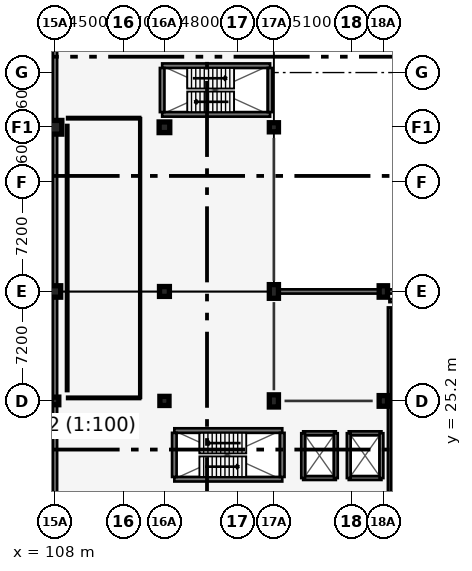
"""IFC4 building model, lengths in metres.
Left out: names, types, materials, properties, quantities, classifications, styles, units other than length and angle.
Written with IfcOpenShell. Run it as: python <this file> out.ifc"""

import sys

from ifc_helpers import new_model, si_unit, direction, frame, frame_2d, origin, origin_2d, place, context, subcontext, project, spatial, rectangle, circle, extrude, element, fill, save


model = new_model("IFC4")
c1 = context("Model", 3, precision=1e-05, world=origin(), true_north=direction((0.0, 1.0)))
c2 = subcontext(c1, "Body", "Model", "MODEL_VIEW")
j1 = project(units=[si_unit("LENGTHUNIT", "METRE"), si_unit("PLANEANGLEUNIT", "RADIAN")], contexts=[c1])
p1 = place(None, origin())
s1 = spatial("IfcSite", under=j1, at=p1, CompositionType="ELEMENT")
p2 = place(p1, origin())
s2 = spatial("IfcBuilding", under=s1, at=p2, CompositionType="ELEMENT")
p3 = place(p2, frame((0.0, 0.0, 9.0)))
s3 = spatial("IfcBuildingStorey", under=s2, at=p3, CompositionType="ELEMENT", Elevation=9.0)
p4 = place(p3, frame((108.0, 25.2, 0.0), z_axis=(0.0, 0.0, 1.0), x_axis=(1.0, 0.0, 0.0)))
e1 = element("IfcColumn", 1, at=p4, inside=s3, PredefinedType="COLUMN", context=c2, shape_type="SweptSolid", body=[
    extrude(circle(Radius=0.25, at=origin_2d()), origin(), (0.0, 0.0, 1.0), 4.2),
])
p5 = place(p3, frame((108.0, 32.4, 0.0), z_axis=(0.0, 0.0, 1.0), x_axis=(1.0, 0.0, 0.0)))
e2 = element("IfcColumn", 2, at=p5, inside=s3, PredefinedType="COLUMN", context=c2, shape_type="SweptSolid", body=[
    extrude(circle(Radius=0.375, at=origin_2d()), origin(), (0.0, 0.0, 1.0), 4.2),
])
p6 = place(p3, frame((108.0, 43.2, 0.0), z_axis=(0.0, 0.0, 1.0), x_axis=(1.0, 0.0, 0.0)))
e3 = element("IfcColumn", 3, at=p6, inside=s3, PredefinedType="COLUMN", context=c2, shape_type="SweptSolid", body=[
    extrude(circle(Radius=0.45, at=origin_2d()), origin(), (0.0, 0.0, 1.0), 4.2),
])
p7 = place(p3, frame((115.2, 25.2, 0.0), z_axis=(0.0, 0.0, 1.0), x_axis=(1.0, 0.0, 0.0)))
e4 = element("IfcColumn", 4, at=p7, inside=s3, PredefinedType="COLUMN", context=c2, shape_type="SweptSolid", body=[
    extrude(rectangle(XDim=0.6, YDim=0.6, at=origin_2d()), origin(), (0.0, 0.0, 1.0), 4.2),
])
p8 = place(p3, frame((115.2, 32.4, 0.0), z_axis=(0.0, 0.0, 1.0), x_axis=(1.0, 0.0, 0.0)))
e5 = element("IfcColumn", 5, at=p8, inside=s3, PredefinedType="COLUMN", context=c2, shape_type="SweptSolid", body=[
    extrude(rectangle(XDim=0.65, YDim=0.65, at=origin_2d()), origin(), (0.0, 0.0, 1.0), 4.2),
])
p9 = place(p3, frame((115.2, 43.2, 0.0), z_axis=(0.0, 0.0, 1.0), x_axis=(1.0, 0.0, 0.0)))
e6 = element("IfcColumn", 6, at=p9, inside=s3, PredefinedType="COLUMN", context=c2, shape_type="SweptSolid", body=[
    extrude(rectangle(XDim=0.7, YDim=0.7, at=origin_2d()), origin(), (0.0, 0.0, 1.0), 4.2),
])
p10 = place(p3, frame((122.4, 25.2, 0.0), z_axis=(0.0, 0.0, 1.0), x_axis=(1.0, 0.0, 0.0)))
e7 = element("IfcColumn", 7, at=p10, inside=s3, PredefinedType="COLUMN", context=c2, shape_type="SweptSolid", body=[
    extrude(rectangle(XDim=0.6, YDim=0.8, at=origin_2d()), origin(), (0.0, 0.0, 1.0), 4.2),
])
p11 = place(p3, frame((122.4, 32.4, 0.0), z_axis=(0.0, 0.0, 1.0), x_axis=(1.0, 0.0, 0.0)))
e8 = element("IfcColumn", 8, at=p11, inside=s3, PredefinedType="COLUMN", context=c2, shape_type="SweptSolid", body=[
    extrude(rectangle(XDim=0.6, YDim=0.9, at=origin_2d()), origin(), (0.0, 0.0, 1.0), 4.2),
])
p12 = place(p3, frame((122.4, 43.2, 0.0), z_axis=(0.0, 0.0, 1.0), x_axis=(1.0, 0.0, 0.0)))
e9 = element("IfcColumn", 9, at=p12, inside=s3, PredefinedType="COLUMN", context=c2, shape_type="SweptSolid", body=[
    extrude(circle(Radius=0.3, at=origin_2d()), origin(), (0.0, 0.0, 1.0), 4.2),
])
p13 = place(p3, frame((129.6, 25.2, 0.0), z_axis=(0.0, 0.0, 1.0), x_axis=(1.0, 0.0, 0.0)))
e10 = element("IfcColumn", 10, at=p13, inside=s3, PredefinedType="COLUMN", context=c2, shape_type="SweptSolid", body=[
    extrude(rectangle(XDim=0.55, YDim=0.7, at=origin_2d()), origin(), (0.0, 0.0, 1.0), 4.2),
])
p14 = place(p3, frame((129.6, 32.4, 0.0), z_axis=(0.0, 0.0, 1.0), x_axis=(1.0, 0.0, 0.0)))
e11 = element("IfcColumn", 11, at=p14, inside=s3, PredefinedType="COLUMN", context=c2, shape_type="SweptSolid", body=[
    extrude(rectangle(XDim=0.55, YDim=0.75, at=origin_2d()), origin(), (0.0, 0.0, 1.0), 4.2),
])
p15 = place(p3, frame((108.0, 54.0, 0.0), z_axis=(0.0, 0.0, 1.0), x_axis=(0.0, -1.0, 0.0)))
e12 = element("IfcWall", 12, at=p15, inside=s3, PredefinedType="SOLIDWALL", context=c2, shape_type="SweptSolid", body=[
    extrude(rectangle(XDim=54.0, YDim=0.28, at=frame_2d((27.0, 0.0))), origin(), (0.0, 0.0, 1.0), 3.4),
])
p16 = place(p15, frame((2.2, 0.0, 0.78)))
e13 = element("IfcOpeningElement", 13, at=p16, cuts=e12, PredefinedType="OPENING", context=c2, shape_type="SweptSolid", body=[
    extrude(rectangle(XDim=1.25, YDim=1.7, at=frame_2d((0.625, 0.85))), frame((0.0, 0.15, 0.0), z_axis=(0.0, -1.0, 0.0), x_axis=(1.0, 0.0, 0.0)), (0.0, 0.0, 1.0), 0.3),
])
p17 = place(p15, frame((16.6, 0.0, 0.78)))
e14 = element("IfcOpeningElement", 14, at=p17, cuts=e12, PredefinedType="OPENING", context=c2, shape_type="SweptSolid", body=[
    extrude(rectangle(XDim=1.5, YDim=1.75, at=frame_2d((0.75, 0.875))), frame((0.0, 0.15, 0.0), z_axis=(0.0, -1.0, 0.0), x_axis=(1.0, 0.0, 0.0)), (0.0, 0.0, 1.0), 0.3),
])
p18 = place(p15, frame((23.8, 0.0, 0.78)))
e15 = element("IfcOpeningElement", 15, at=p18, cuts=e12, PredefinedType="OPENING", context=c2, shape_type="SweptSolid", body=[
    extrude(rectangle(XDim=1.65, YDim=1.8, at=frame_2d((0.825, 0.9))), frame((0.0, 0.15, 0.0), z_axis=(0.0, -1.0, 0.0), x_axis=(1.0, 0.0, 0.0)), (0.0, 0.0, 1.0), 0.3),
])
p19 = place(p15, frame((31.0, 0.0, 0.78)))
e16 = element("IfcOpeningElement", 16, at=p19, cuts=e12, PredefinedType="OPENING", context=c2, shape_type="SweptSolid", body=[
    extrude(rectangle(XDim=1.95, YDim=1.8, at=frame_2d((0.975, 0.9))), frame((0.0, 0.15, 0.0), z_axis=(0.0, -1.0, 0.0), x_axis=(1.0, 0.0, 0.0)), (0.0, 0.0, 1.0), 0.3),
])
p20 = place(p15, frame((38.2, 0.0, 0.78)))
e17 = element("IfcOpeningElement", 17, at=p20, cuts=e12, PredefinedType="OPENING", context=c2, shape_type="SweptSolid", body=[
    extrude(rectangle(XDim=2.1, YDim=1.8, at=frame_2d((1.05, 0.9))), frame((0.0, 0.15, 0.0), z_axis=(0.0, -1.0, 0.0), x_axis=(1.0, 0.0, 0.0)), (0.0, 0.0, 1.0), 0.3),
])
p21 = place(p3, frame((165.6, 32.4, 0.0), z_axis=(0.0, 0.0, 1.0), x_axis=(-1.0, 0.0, 0.0)))
e18 = element("IfcWall", 18, at=p21, inside=s3, PredefinedType="SOLIDWALL", context=c2, shape_type="SweptSolid", body=[
    extrude(rectangle(XDim=43.2, YDim=0.28, at=frame_2d((21.6, 0.0))), origin(), (0.0, 0.0, 1.0), 3.4),
])
p22 = place(p21, frame((2.2, 0.0, 0.78)))
e19 = element("IfcOpeningElement", 19, at=p22, cuts=e18, PredefinedType="OPENING", context=c2, shape_type="SweptSolid", body=[
    extrude(rectangle(XDim=2.1, YDim=1.8, at=frame_2d((1.05, 0.9))), frame((0.0, 0.15, 0.0), z_axis=(0.0, -1.0, 0.0), x_axis=(1.0, 0.0, 0.0)), (0.0, 0.0, 1.0), 0.3),
])
p23 = place(p21, frame((9.4, 0.0, 0.78)))
e20 = element("IfcOpeningElement", 20, at=p23, cuts=e18, PredefinedType="OPENING", context=c2, shape_type="SweptSolid", body=[
    extrude(rectangle(XDim=1.1, YDim=1.65, at=frame_2d((0.55, 0.825))), frame((0.0, 0.15, 0.0), z_axis=(0.0, -1.0, 0.0), x_axis=(1.0, 0.0, 0.0)), (0.0, 0.0, 1.0), 0.3),
])
p24 = place(p21, frame((16.6, 0.0, 0.78)))
e21 = element("IfcOpeningElement", 21, at=p24, cuts=e18, PredefinedType="OPENING", context=c2, shape_type="SweptSolid", body=[
    extrude(rectangle(XDim=1.25, YDim=1.7, at=frame_2d((0.625, 0.85))), frame((0.0, 0.15, 0.0), z_axis=(0.0, -1.0, 0.0), x_axis=(1.0, 0.0, 0.0)), (0.0, 0.0, 1.0), 0.3),
])
p25 = place(p21, frame((23.8, 0.0, 0.78)))
e22 = element("IfcOpeningElement", 22, at=p25, cuts=e18, PredefinedType="OPENING", context=c2, shape_type="SweptSolid", body=[
    extrude(rectangle(XDim=1.35, YDim=1.75, at=frame_2d((0.675, 0.875))), frame((0.0, 0.15, 0.0), z_axis=(0.0, -1.0, 0.0), x_axis=(1.0, 0.0, 0.0)), (0.0, 0.0, 1.0), 0.3),
])
p26 = place(p21, frame((31.0, 0.0, 0.78)))
e23 = element("IfcOpeningElement", 23, at=p26, cuts=e18, PredefinedType="OPENING", context=c2, shape_type="SweptSolid", body=[
    extrude(rectangle(XDim=1.5, YDim=1.75, at=frame_2d((0.75, 0.875))), frame((0.0, 0.15, 0.0), z_axis=(0.0, -1.0, 0.0), x_axis=(1.0, 0.0, 0.0)), (0.0, 0.0, 1.0), 0.3),
])
p27 = place(p3, frame((115.85, 20.05, 0.0), z_axis=(0.0, 0.0, 1.0), x_axis=(1.0, 0.0, 0.0)))
e24 = element("IfcWall", 24, at=p27, inside=s3, PredefinedType="SHEAR", context=c2, shape_type="SweptSolid", body=[
    extrude(rectangle(XDim=7.1, YDim=0.3, at=frame_2d((3.55, 0.0))), origin(), (0.0, 0.0, 1.0), 3.875),
])
p28 = place(p27, frame((0.35, 0.0, 0.0)))
e25 = element("IfcOpeningElement", 25, at=p28, cuts=e24, PredefinedType="OPENING", context=c2, shape_type="SweptSolid", body=[
    extrude(rectangle(XDim=1.05, YDim=2.15, at=frame_2d((0.525, 1.075))), frame((0.0, 0.16, 0.0), z_axis=(0.0, -1.0, 0.0), x_axis=(1.0, 0.0, 0.0)), (0.0, 0.0, 1.0), 0.32),
])
p29 = place(p3, frame((122.95, 23.25, 0.0), z_axis=(0.0, 0.0, 1.0), x_axis=(-1.0, 0.0, 0.0)))
e26 = element("IfcWall", 26, at=p29, inside=s3, PredefinedType="SHEAR", context=c2, shape_type="SweptSolid", body=[
    extrude(rectangle(XDim=7.1, YDim=0.3, at=frame_2d((3.55, 0.0))), origin(), (0.0, 0.0, 1.0), 3.875),
])
for number, where, z_axis, x_axis in (
    (27, (122.95, 20.2, 0.0), (0.0, 0.0, 1.0), (0.0, 1.0, 0.0)),
    (28, (115.85, 23.1, 0.0), (0.0, 0.0, 1.0), (0.0, -1.0, 0.0)),
):
    element("IfcWall", number, at=place(p3, frame(where, z_axis=z_axis, x_axis=x_axis)), inside=s3, PredefinedType="SHEAR", context=c2, shape_type="SweptSolid", body=[
        extrude(rectangle(XDim=2.9, YDim=0.3, at=frame_2d((1.45, 0.0))), origin(), (0.0, 0.0, 1.0), 3.875),
    ])
for number, where, z_axis, x_axis in (
    (29, (115.05, 44.05, 0.0), (0.0, 0.0, 1.0), (1.0, 0.0, 0.0)),
    (30, (122.15, 47.25, 0.0), (0.0, 0.0, 1.0), (-1.0, 0.0, 0.0)),
):
    element("IfcWall", number, at=place(p3, frame(where, z_axis=z_axis, x_axis=x_axis)), inside=s3, PredefinedType="SHEAR", context=c2, shape_type="SweptSolid", body=[
        extrude(rectangle(XDim=7.1, YDim=0.3, at=frame_2d((3.55, 0.0))), origin(), (0.0, 0.0, 1.0), 3.45),
    ])
p30 = place(p3, frame((122.15, 44.2, 0.0), z_axis=(0.0, 0.0, 1.0), x_axis=(0.0, 1.0, 0.0)))
e31 = element("IfcWall", 31, at=p30, inside=s3, PredefinedType="SHEAR", context=c2, shape_type="SweptSolid", body=[
    extrude(rectangle(XDim=2.9, YDim=0.3, at=frame_2d((1.45, 0.0))), origin(), (0.0, 0.0, 1.0), 3.45),
])
p31 = place(p3, frame((115.05, 47.1, 0.0), z_axis=(0.0, 0.0, 1.0), x_axis=(0.0, -1.0, 0.0)))
e32 = element("IfcWall", 32, at=p31, inside=s3, PredefinedType="SHEAR", context=c2, shape_type="SweptSolid", body=[
    extrude(rectangle(XDim=2.9, YDim=0.3, at=frame_2d((1.45, 0.0))), origin(), (0.0, 0.0, 1.0), 3.45),
])
p32 = place(p31, frame((0.75, 0.0, 0.0)))
e33 = element("IfcOpeningElement", 33, at=p32, cuts=e32, PredefinedType="OPENING", context=c2, shape_type="SweptSolid", body=[
    extrude(rectangle(XDim=1.05, YDim=2.15, at=frame_2d((0.525, 1.075))), frame((0.0, 0.16, 0.0), z_axis=(0.0, -1.0, 0.0), x_axis=(1.0, 0.0, 0.0)), (0.0, 0.0, 1.0), 0.32),
])
p33 = place(p3, frame((124.325, 20.125, 0.0), z_axis=(0.0, 0.0, 1.0), x_axis=(1.0, 0.0, 0.0)))
e34 = element("IfcWall", 34, at=p33, inside=s3, PredefinedType="SHEAR", context=c2, shape_type="SweptSolid", body=[
    extrude(rectangle(XDim=2.15, YDim=0.25, at=frame_2d((1.075, 0.0))), origin(), (0.0, 0.0, 1.0), 3.9),
])
p34 = place(p3, frame((126.475, 23.075, 0.0), z_axis=(0.0, 0.0, 1.0), x_axis=(-1.0, 0.0, 0.0)))
e35 = element("IfcWall", 35, at=p34, inside=s3, PredefinedType="SHEAR", context=c2, shape_type="SweptSolid", body=[
    extrude(rectangle(XDim=2.15, YDim=0.25, at=frame_2d((1.075, 0.0))), origin(), (0.0, 0.0, 1.0), 3.9),
])
p35 = place(p34, frame((0.525, 0.0, 0.0)))
e36 = element("IfcOpeningElement", 36, at=p35, cuts=e35, PredefinedType="OPENING", context=c2, shape_type="SweptSolid", body=[
    extrude(rectangle(XDim=1.1, YDim=2.15, at=frame_2d((0.55, 1.075))), frame((0.0, 0.135, 0.0), z_axis=(0.0, -1.0, 0.0), x_axis=(1.0, 0.0, 0.0)), (0.0, 0.0, 1.0), 0.27),
])
for number, where, z_axis, x_axis in (
    (37, (124.325, 23.075, 0.0), (0.0, 0.0, 1.0), (0.0, -1.0, 0.0)),
    (38, (126.475, 20.125, 0.0), (0.0, 0.0, 1.0), (0.0, 1.0, 0.0)),
):
    element("IfcWall", number, at=place(p3, frame(where, z_axis=z_axis, x_axis=x_axis)), inside=s3, PredefinedType="SHEAR", context=c2, shape_type="SweptSolid", body=[
        extrude(rectangle(XDim=2.95, YDim=0.25, at=frame_2d((1.475, 0.0))), origin(), (0.0, 0.0, 1.0), 3.9),
    ])
p36 = place(p3, frame((127.325, 20.125, 0.0), z_axis=(0.0, 0.0, 1.0), x_axis=(1.0, 0.0, 0.0)))
e39 = element("IfcWall", 39, at=p36, inside=s3, PredefinedType="SHEAR", context=c2, shape_type="SweptSolid", body=[
    extrude(rectangle(XDim=2.15, YDim=0.25, at=frame_2d((1.075, 0.0))), origin(), (0.0, 0.0, 1.0), 3.9),
])
p37 = place(p3, frame((129.475, 23.075, 0.0), z_axis=(0.0, 0.0, 1.0), x_axis=(-1.0, 0.0, 0.0)))
e40 = element("IfcWall", 40, at=p37, inside=s3, PredefinedType="SHEAR", context=c2, shape_type="SweptSolid", body=[
    extrude(rectangle(XDim=2.15, YDim=0.25, at=frame_2d((1.075, 0.0))), origin(), (0.0, 0.0, 1.0), 3.9),
])
p38 = place(p37, frame((0.525, 0.0, 0.0)))
e41 = element("IfcOpeningElement", 41, at=p38, cuts=e40, PredefinedType="OPENING", context=c2, shape_type="SweptSolid", body=[
    extrude(rectangle(XDim=1.1, YDim=2.15, at=frame_2d((0.55, 1.075))), frame((0.0, 0.135, 0.0), z_axis=(0.0, -1.0, 0.0), x_axis=(1.0, 0.0, 0.0)), (0.0, 0.0, 1.0), 0.27),
])
for number, where, z_axis, x_axis in (
    (42, (127.325, 23.075, 0.0), (0.0, 0.0, 1.0), (0.0, -1.0, 0.0)),
    (43, (129.475, 20.125, 0.0), (0.0, 0.0, 1.0), (0.0, 1.0, 0.0)),
):
    element("IfcWall", number, at=place(p3, frame(where, z_axis=z_axis, x_axis=x_axis)), inside=s3, PredefinedType="SHEAR", context=c2, shape_type="SweptSolid", body=[
        extrude(rectangle(XDim=2.95, YDim=0.25, at=frame_2d((1.475, 0.0))), origin(), (0.0, 0.0, 1.0), 3.9),
    ])
p39 = place(p3, frame((130.0, 31.8, 0.0), z_axis=(0.0, 0.0, 1.0), x_axis=(1.0, 0.0, 0.0)))
e44 = element("IfcWall", 44, at=p39, inside=s3, PredefinedType="SOLIDWALL", context=c2, shape_type="SweptSolid", body=[
    extrude(rectangle(XDim=20.8, YDim=0.2, at=frame_2d((10.4, 0.0))), origin(), (0.0, 0.0, 1.0), 3.502),
])
p40 = place(p3, frame((130.0, 31.35, 0.0), z_axis=(0.0, 0.0, 1.0), x_axis=(0.0, -1.0, 0.0)))
e45 = element("IfcWall", 45, at=p40, inside=s3, PredefinedType="SOLIDWALL", context=c2, shape_type="SweptSolid", body=[
    extrude(rectangle(XDim=12.95, YDim=0.2, at=frame_2d((6.475, 0.0))), origin(), (0.0, 0.0, 1.0), 3.257),
])
p41 = place(p3, frame((108.8, 43.8, 0.0), z_axis=(0.0, 0.0, 1.0), x_axis=(1.0, 0.0, 0.0)))
e46 = element("IfcWall", 46, at=p41, inside=s3, PredefinedType="PARTITIONING", context=c2, shape_type="SweptSolid", body=[
    extrude(rectangle(XDim=4.8, YDim=0.15, at=frame_2d((2.4, 0.0))), origin(), (0.0, 0.0, 1.0), 3.6),
])
p42 = place(p3, frame((113.6, 25.4, 0.0), z_axis=(0.0, 0.0, 1.0), x_axis=(-1.0, 0.0, 0.0)))
e47 = element("IfcWall", 47, at=p42, inside=s3, PredefinedType="PARTITIONING", context=c2, shape_type="SweptSolid", body=[
    extrude(rectangle(XDim=4.8, YDim=0.15, at=frame_2d((2.4, 0.0))), origin(), (0.0, 0.0, 1.0), 2.952),
])
p43 = place(p3, frame((108.8, 43.35, 0.0), z_axis=(0.0, 0.0, 1.0), x_axis=(0.0, -1.0, 0.0)))
e48 = element("IfcWall", 48, at=p43, inside=s3, PredefinedType="PARTITIONING", context=c2, shape_type="SweptSolid", body=[
    extrude(rectangle(XDim=17.5, YDim=0.15, at=frame_2d((8.75, 0.0))), origin(), (0.0, 0.0, 1.0), 3.482),
])
p44 = place(p3, frame((113.6, 25.4, 0.0), z_axis=(0.0, 0.0, 1.0), x_axis=(0.0, 1.0, 0.0)))
e49 = element("IfcWall", 49, at=p44, inside=s3, PredefinedType="PARTITIONING", context=c2, shape_type="SweptSolid", body=[
    extrude(rectangle(XDim=18.4, YDim=0.11, at=frame_2d((9.2, 0.0))), origin(), (0.0, 0.0, 1.0), 2.952),
])
p45 = place(p44, frame((8.715, 0.0, 0.0)))
e50 = element("IfcOpeningElement", 50, at=p45, cuts=e49, PredefinedType="OPENING", context=c2, shape_type="SweptSolid", body=[
    extrude(rectangle(XDim=0.97, YDim=2.15, at=frame_2d((0.485, 1.075))), frame((0.0, 0.065, 0.0), z_axis=(0.0, -1.0, 0.0), x_axis=(1.0, 0.0, 0.0)), (0.0, 0.0, 1.0), 0.13),
])
p46 = place(p17, origin())
e51 = element("IfcWindow", 51, at=p46, inside=s3, PartitioningType="SINGLE_PANEL", PredefinedType="WINDOW", context=c2, shape_type="SweptSolid", body=[
    extrude(rectangle(XDim=1.5, YDim=1.75, at=frame_2d((0.75, 0.875))), frame((0.0, 0.03, 0.0), z_axis=(0.0, -1.0, 0.0), x_axis=(1.0, 0.0, 0.0)), (0.0, 0.0, 1.0), 0.06),
])
fill(e14, e51)
p47 = place(p18, origin())
e52 = element("IfcWindow", 52, at=p47, inside=s3, PartitioningType="SINGLE_PANEL", PredefinedType="WINDOW", context=c2, shape_type="SweptSolid", body=[
    extrude(rectangle(XDim=1.65, YDim=1.8, at=frame_2d((0.825, 0.9))), frame((0.0, 0.03, 0.0), z_axis=(0.0, -1.0, 0.0), x_axis=(1.0, 0.0, 0.0)), (0.0, 0.0, 1.0), 0.06),
])
fill(e15, e52)
p48 = place(p19, origin())
e53 = element("IfcWindow", 53, at=p48, inside=s3, PartitioningType="SINGLE_PANEL", PredefinedType="WINDOW", context=c2, shape_type="SweptSolid", body=[
    extrude(rectangle(XDim=1.95, YDim=1.8, at=frame_2d((0.975, 0.9))), frame((0.0, 0.03, 0.0), z_axis=(0.0, -1.0, 0.0), x_axis=(1.0, 0.0, 0.0)), (0.0, 0.0, 1.0), 0.06),
])
fill(e16, e53)
p49 = place(p28, origin())
e54 = element("IfcDoor", 54, at=p49, inside=s3, OperationType="SINGLE_SWING_LEFT", PredefinedType="DOOR", context=c2, shape_type="SweptSolid", body=[
    extrude(rectangle(XDim=1.05, YDim=2.15, at=frame_2d((0.525, 1.075))), frame((0.0, 0.025, 0.0), z_axis=(0.0, -1.0, 0.0), x_axis=(1.0, 0.0, 0.0)), (0.0, 0.0, 1.0), 0.05),
])
fill(e25, e54)
p50 = place(p32, origin())
e55 = element("IfcDoor", 55, at=p50, inside=s3, OperationType="SINGLE_SWING_LEFT", PredefinedType="DOOR", context=c2, shape_type="SweptSolid", body=[
    extrude(rectangle(XDim=1.05, YDim=2.15, at=frame_2d((0.525, 1.075))), frame((0.0, 0.025, 0.0), z_axis=(0.0, -1.0, 0.0), x_axis=(1.0, 0.0, 0.0)), (0.0, 0.0, 1.0), 0.05),
])
fill(e33, e55)
p51 = place(p35, origin())
e56 = element("IfcDoor", 56, at=p51, inside=s3, OperationType="SLIDING_TO_LEFT", PredefinedType="DOOR", context=c2, shape_type="SweptSolid", body=[
    extrude(rectangle(XDim=1.1, YDim=2.15, at=frame_2d((0.55, 1.075))), frame((0.0, 0.025, 0.0), z_axis=(0.0, -1.0, 0.0), x_axis=(1.0, 0.0, 0.0)), (0.0, 0.0, 1.0), 0.05),
])
fill(e36, e56)
p52 = place(p38, origin())
e57 = element("IfcDoor", 57, at=p52, inside=s3, OperationType="SLIDING_TO_LEFT", PredefinedType="DOOR", context=c2, shape_type="SweptSolid", body=[
    extrude(rectangle(XDim=1.1, YDim=2.15, at=frame_2d((0.55, 1.075))), frame((0.0, 0.025, 0.0), z_axis=(0.0, -1.0, 0.0), x_axis=(1.0, 0.0, 0.0)), (0.0, 0.0, 1.0), 0.05),
])
fill(e41, e57)
p53 = place(p45, origin())
e58 = element("IfcDoor", 58, at=p53, inside=s3, OperationType="SINGLE_SWING_RIGHT", PredefinedType="DOOR", context=c2, shape_type="SweptSolid", body=[
    extrude(rectangle(XDim=0.97, YDim=2.15, at=frame_2d((0.485, 1.075))), frame((0.0, 0.025, 0.0), z_axis=(0.0, -1.0, 0.0), x_axis=(1.0, 0.0, 0.0)), (0.0, 0.0, 1.0), 0.05),
])
fill(e50, e58)
save(model, sys.argv[1])
